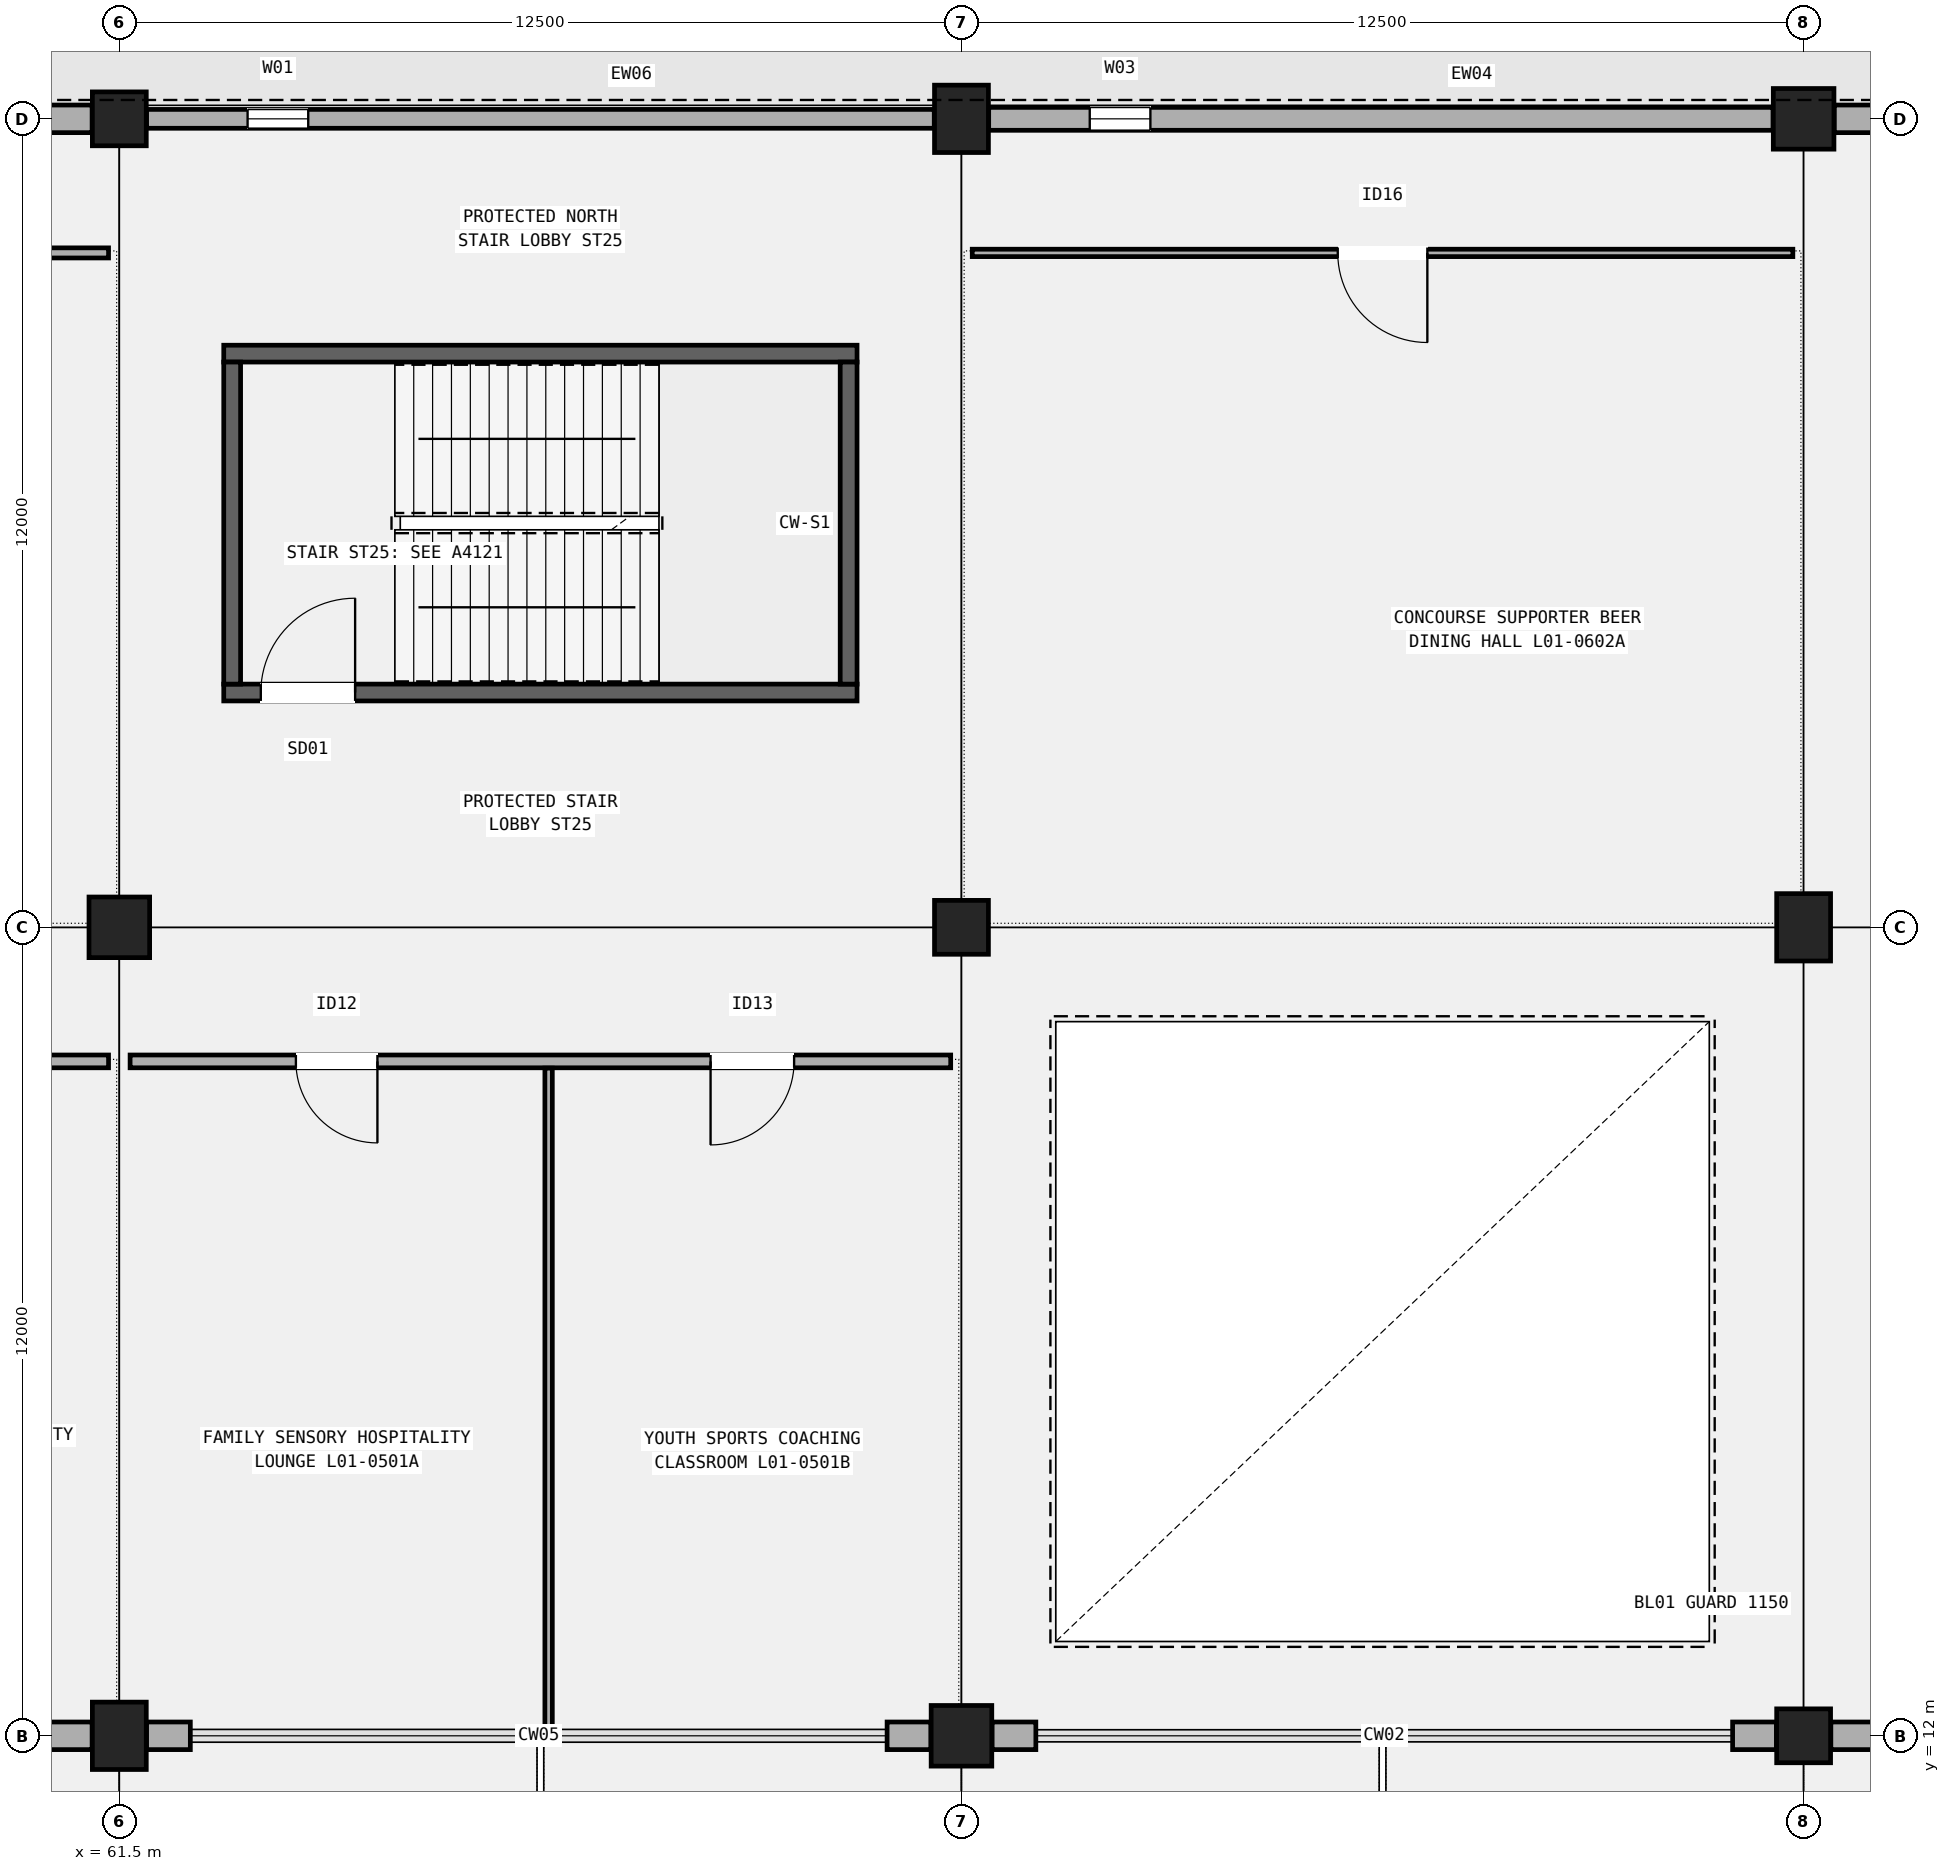
"""IFC4 building model, lengths in metres.
Left out: names, types, materials, properties, quantities, classifications, styles, units other than length and angle.
Written with IfcOpenShell. Run it as: python <this file> out.ifc"""

import sys

from ifc_helpers import new_model, si_unit, direction, frame, frame_2d, origin, origin_2d, place, context, subcontext, project, spatial, rectangle, extrude, element, fill, save


model = new_model("IFC4")
c1 = context("Model", 3, precision=1e-05, world=origin(), true_north=direction((0.0, 1.0)))
c2 = subcontext(c1, "Body", "Model", "MODEL_VIEW")
j1 = project(units=[si_unit("LENGTHUNIT", "METRE"), si_unit("PLANEANGLEUNIT", "RADIAN")], contexts=[c1])
p1 = place(None, origin())
s1 = spatial("IfcSite", under=j1, at=p1, CompositionType="ELEMENT")
p2 = place(p1, origin())
s2 = spatial("IfcBuilding", under=s1, at=p2, CompositionType="ELEMENT")
p3 = place(p2, frame((0.0, 0.0, 5.4)))
s3 = spatial("IfcBuildingStorey", under=s2, at=p3, CompositionType="ELEMENT", Elevation=5.4)
p4 = place(p3, frame((61.5, 12.0, 0.0), z_axis=(0.0, 0.0, 1.0), x_axis=(1.0, 0.0, 0.0)))
e1 = element("IfcColumn", 1, at=p4, inside=s3, PredefinedType="COLUMN", context=c2, shape_type="SweptSolid", body=[
    extrude(rectangle(XDim=0.8, YDim=1.0, at=origin_2d()), origin(), (0.0, 0.0, 1.0), 4.8),
])
p5 = place(p3, frame((61.5, 24.0, 0.0), z_axis=(0.0, 0.0, 1.0), x_axis=(1.0, 0.0, 0.0)))
e2 = element("IfcColumn", 2, at=p5, inside=s3, PredefinedType="COLUMN", context=c2, shape_type="SweptSolid", body=[
    extrude(rectangle(XDim=0.9, YDim=0.9, at=origin_2d()), origin(), (0.0, 0.0, 1.0), 4.8),
])
p6 = place(p3, frame((61.5, 36.0, 0.0), z_axis=(0.0, 0.0, 1.0), x_axis=(1.0, 0.0, 0.0)))
e3 = element("IfcColumn", 3, at=p6, inside=s3, PredefinedType="COLUMN", context=c2, shape_type="SweptSolid", body=[
    extrude(rectangle(XDim=0.8, YDim=0.8, at=origin_2d()), origin(), (0.0, 0.0, 1.0), 4.8),
])
p7 = place(p3, frame((74.0, 12.0, 0.0), z_axis=(0.0, 0.0, 1.0), x_axis=(1.0, 0.0, 0.0)))
e4 = element("IfcColumn", 4, at=p7, inside=s3, PredefinedType="COLUMN", context=c2, shape_type="SweptSolid", body=[
    extrude(rectangle(XDim=0.9, YDim=0.9, at=origin_2d()), origin(), (0.0, 0.0, 1.0), 4.8),
])
p8 = place(p3, frame((74.0, 24.0, 0.0), z_axis=(0.0, 0.0, 1.0), x_axis=(1.0, 0.0, 0.0)))
e5 = element("IfcColumn", 5, at=p8, inside=s3, PredefinedType="COLUMN", context=c2, shape_type="SweptSolid", body=[
    extrude(rectangle(XDim=0.8, YDim=0.8, at=origin_2d()), origin(), (0.0, 0.0, 1.0), 4.8),
])
p9 = place(p3, frame((74.0, 36.0, 0.0), z_axis=(0.0, 0.0, 1.0), x_axis=(1.0, 0.0, 0.0)))
e6 = element("IfcColumn", 6, at=p9, inside=s3, PredefinedType="COLUMN", context=c2, shape_type="SweptSolid", body=[
    extrude(rectangle(XDim=0.8, YDim=1.0, at=origin_2d()), origin(), (0.0, 0.0, 1.0), 4.8),
])
p10 = place(p3, frame((86.5, 12.0, 0.0), z_axis=(0.0, 0.0, 1.0), x_axis=(1.0, 0.0, 0.0)))
e7 = element("IfcColumn", 7, at=p10, inside=s3, PredefinedType="COLUMN", context=c2, shape_type="SweptSolid", body=[
    extrude(rectangle(XDim=0.8, YDim=0.8, at=origin_2d()), origin(), (0.0, 0.0, 1.0), 4.8),
])
p11 = place(p3, frame((86.5, 24.0, 0.0), z_axis=(0.0, 0.0, 1.0), x_axis=(1.0, 0.0, 0.0)))
e8 = element("IfcColumn", 8, at=p11, inside=s3, PredefinedType="COLUMN", context=c2, shape_type="SweptSolid", body=[
    extrude(rectangle(XDim=0.8, YDim=1.0, at=origin_2d()), origin(), (0.0, 0.0, 1.0), 4.8),
])
p12 = place(p3, frame((86.5, 36.0, 0.0), z_axis=(0.0, 0.0, 1.0), x_axis=(1.0, 0.0, 0.0)))
e9 = element("IfcColumn", 9, at=p12, inside=s3, PredefinedType="COLUMN", context=c2, shape_type="SweptSolid", body=[
    extrude(rectangle(XDim=0.9, YDim=0.9, at=origin_2d()), origin(), (0.0, 0.0, 1.0), 4.8),
])
p13 = place(p3, frame((60.446, 12.0, 0.0), z_axis=(0.0, 0.0, 1.0), x_axis=(1.0, 0.0, 0.0)))
e10 = element("IfcWall", 10, at=p13, inside=s3, PredefinedType="SOLIDWALL", context=c2, shape_type="SweptSolid", body=[
    extrude(rectangle(XDim=0.65, YDim=0.41, at=frame_2d((0.325, 0.0))), origin(), (0.0, 0.0, 1.0), 4.2),
])
p14 = place(p3, frame((49.454, 36.0, 0.0), z_axis=(0.0, 0.0, 1.0), x_axis=(1.0, 0.0, 0.0)))
e11 = element("IfcWall", 11, at=p14, inside=s3, PredefinedType="SOLIDWALL", context=c2, shape_type="SweptSolid", body=[
    extrude(rectangle(XDim=11.642, YDim=0.41, at=frame_2d((5.821, 0.0))), origin(), (0.0, 0.0, 1.0), 4.2),
])
p15 = place(p14, frame((1.5, 0.0, 0.95)))
e12 = element("IfcOpeningElement", 12, at=p15, cuts=e11, PredefinedType="OPENING", context=c2, shape_type="SweptSolid", body=[
    extrude(rectangle(XDim=3.6, YDim=1.75, at=frame_2d((1.8, 0.875))), frame((0.0, 0.215, 0.0), z_axis=(0.0, -1.0, 0.0), x_axis=(1.0, 0.0, 0.0)), (0.0, 0.0, 1.0), 0.43),
])
for number, where, z_axis, x_axis in (
    (13, (61.904, 12.0, 0.0), (0.0, 0.0, 1.0), (1.0, 0.0, 0.0)),
    (14, (72.896, 12.0, 0.0), (0.0, 0.0, 1.0), (1.0, 0.0, 0.0)),
):
    element("IfcWall", number, at=place(p3, frame(where, z_axis=z_axis, x_axis=x_axis)), inside=s3, PredefinedType="SOLIDWALL", context=c2, shape_type="SweptSolid", body=[
        extrude(rectangle(XDim=0.65, YDim=0.41, at=frame_2d((0.325, 0.0))), origin(), (0.0, 0.0, 1.0), 4.15),
    ])
p16 = place(p3, frame((61.904, 36.0, 0.0), z_axis=(0.0, 0.0, 1.0), x_axis=(1.0, 0.0, 0.0)))
e15 = element("IfcWall", 15, at=p16, inside=s3, PredefinedType="SOLIDWALL", context=c2, shape_type="SweptSolid", body=[
    extrude(rectangle(XDim=11.692, YDim=0.28, at=frame_2d((5.846, 0.0))), origin(), (0.0, 0.0, 1.0), 4.15),
])
p17 = place(p16, frame((1.5, 0.0, 0.95)))
e16 = element("IfcOpeningElement", 16, at=p17, cuts=e15, PredefinedType="OPENING", context=c2, shape_type="SweptSolid", body=[
    extrude(rectangle(XDim=0.9, YDim=2.1, at=frame_2d((0.45, 1.05))), frame((0.0, 0.15, 0.0), z_axis=(0.0, -1.0, 0.0), x_axis=(1.0, 0.0, 0.0)), (0.0, 0.0, 1.0), 0.3),
])
for number, where, z_axis, x_axis in (
    (17, (74.454, 12.0, 0.0), (0.0, 0.0, 1.0), (1.0, 0.0, 0.0)),
    (18, (85.446, 12.0, 0.0), (0.0, 0.0, 1.0), (1.0, 0.0, 0.0)),
):
    element("IfcWall", number, at=place(p3, frame(where, z_axis=z_axis, x_axis=x_axis)), inside=s3, PredefinedType="SOLIDWALL", context=c2, shape_type="SweptSolid", body=[
        extrude(rectangle(XDim=0.65, YDim=0.41, at=frame_2d((0.325, 0.0))), origin(), (0.0, 0.0, 1.0), 4.2),
    ])
p18 = place(p3, frame((74.404, 36.0, 0.0), z_axis=(0.0, 0.0, 1.0), x_axis=(1.0, 0.0, 0.0)))
e19 = element("IfcWall", 19, at=p18, inside=s3, PredefinedType="SOLIDWALL", context=c2, shape_type="SweptSolid", body=[
    extrude(rectangle(XDim=11.642, YDim=0.34, at=frame_2d((5.821, 0.0))), origin(), (0.0, 0.0, 1.0), 4.2),
])
p19 = place(p18, frame((1.5, 0.0, 0.95)))
e20 = element("IfcOpeningElement", 20, at=p19, cuts=e19, PredefinedType="OPENING", context=c2, shape_type="SweptSolid", body=[
    extrude(rectangle(XDim=0.9, YDim=2.7, at=frame_2d((0.45, 1.35))), frame((0.0, 0.18, 0.0), z_axis=(0.0, -1.0, 0.0), x_axis=(1.0, 0.0, 0.0)), (0.0, 0.0, 1.0), 0.36),
])
p20 = place(p3, frame((86.904, 12.0, 0.0), z_axis=(0.0, 0.0, 1.0), x_axis=(1.0, 0.0, 0.0)))
e21 = element("IfcWall", 21, at=p20, inside=s3, PredefinedType="SOLIDWALL", context=c2, shape_type="SweptSolid", body=[
    extrude(rectangle(XDim=0.65, YDim=0.41, at=frame_2d((0.325, 0.0))), origin(), (0.0, 0.0, 1.0), 4.15),
])
p21 = place(p3, frame((86.954, 36.0, 0.0), z_axis=(0.0, 0.0, 1.0), x_axis=(1.0, 0.0, 0.0)))
e22 = element("IfcWall", 22, at=p21, inside=s3, PredefinedType="SOLIDWALL", context=c2, shape_type="SweptSolid", body=[
    extrude(rectangle(XDim=11.642, YDim=0.41, at=frame_2d((5.821, 0.0))), origin(), (0.0, 0.0, 1.0), 4.15),
])
p22 = place(p21, frame((1.5, 0.0, 0.95)))
e23 = element("IfcOpeningElement", 23, at=p22, cuts=e22, PredefinedType="OPENING", context=c2, shape_type="SweptSolid", body=[
    extrude(rectangle(XDim=1.2, YDim=1.9, at=frame_2d((0.6, 0.95))), frame((0.0, 0.215, 0.0), z_axis=(0.0, -1.0, 0.0), x_axis=(1.0, 0.0, 0.0)), (0.0, 0.0, 1.0), 0.43),
])
p23 = place(p3, frame((63.05, 27.485, 0.0), z_axis=(0.0, 0.0, 1.0), x_axis=(1.0, 0.0, 0.0)))
e24 = element("IfcWall", 24, at=p23, inside=s3, PredefinedType="SHEAR", context=c2, shape_type="SweptSolid", body=[
    extrude(rectangle(XDim=9.4, YDim=0.25, at=frame_2d((4.7, 0.0))), origin(), (0.0, 0.0, 1.0), 4.55),
])
p24 = place(p23, frame((0.55, 0.0, 0.0)))
e25 = element("IfcOpeningElement", 25, at=p24, cuts=e24, PredefinedType="OPENING", context=c2, shape_type="SweptSolid", body=[
    extrude(rectangle(XDim=1.4, YDim=2.15, at=frame_2d((0.7, 1.075))), frame((0.0, 0.135, 0.0), z_axis=(0.0, -1.0, 0.0), x_axis=(1.0, 0.0, 0.0)), (0.0, 0.0, 1.0), 0.27),
])
p25 = place(p3, frame((63.05, 32.515, 0.0), z_axis=(0.0, 0.0, 1.0), x_axis=(1.0, 0.0, 0.0)))
e26 = element("IfcWall", 26, at=p25, inside=s3, PredefinedType="SHEAR", context=c2, shape_type="SweptSolid", body=[
    extrude(rectangle(XDim=9.4, YDim=0.25, at=frame_2d((4.7, 0.0))), origin(), (0.0, 0.0, 1.0), 4.55),
])
for number, where, z_axis, x_axis in (
    (27, (63.175, 27.61, 0.0), (0.0, 0.0, 1.0), (0.0, 1.0, 0.0)),
    (28, (72.325, 27.61, 0.0), (0.0, 0.0, 1.0), (0.0, 1.0, 0.0)),
):
    element("IfcWall", number, at=place(p3, frame(where, z_axis=z_axis, x_axis=x_axis)), inside=s3, PredefinedType="SHEAR", context=c2, shape_type="SweptSolid", body=[
        extrude(rectangle(XDim=4.78, YDim=0.25, at=frame_2d((2.39, 0.0))), origin(), (0.0, 0.0, 1.0), 4.55),
    ])
p26 = place(p3, frame((50.92, 22.01, 0.0), z_axis=(0.0, 0.0, 1.0), x_axis=(1.0, 0.0, 0.0)))
e29 = element("IfcWall", 29, at=p26, inside=s3, PredefinedType="PARTITIONING", context=c2, shape_type="SweptSolid", body=[
    extrude(rectangle(XDim=10.42, YDim=0.19, at=frame_2d((5.21, 0.0))), origin(), (0.0, 0.0, 1.0), 3.92),
])
p27 = place(p26, frame((3.147, 0.0, 0.0), z_axis=(0.0, 0.0, 1.0), x_axis=(-1.0, 0.0, 0.0)))
e30 = element("IfcOpeningElement", 30, at=p27, cuts=e29, PredefinedType="OPENING", context=c2, shape_type="SweptSolid", body=[
    extrude(rectangle(XDim=1.06, YDim=2.15, at=frame_2d((0.53, 1.075))), frame((0.0, 0.105, 0.0), z_axis=(0.0, -1.0, 0.0), x_axis=(1.0, 0.0, 0.0)), (0.0, 0.0, 1.0), 0.21),
])
p28 = place(p26, frame((8.452, 0.0, 0.0), z_axis=(0.0, 0.0, 1.0), x_axis=(-1.0, 0.0, 0.0)))
e31 = element("IfcOpeningElement", 31, at=p28, cuts=e29, PredefinedType="OPENING", context=c2, shape_type="SweptSolid", body=[
    extrude(rectangle(XDim=1.09, YDim=2.16, at=frame_2d((0.545, 1.08))), frame((0.0, 0.105, 0.0), z_axis=(0.0, -1.0, 0.0), x_axis=(1.0, 0.0, 0.0)), (0.0, 0.0, 1.0), 0.21),
])
p29 = place(p3, frame((50.92, 34.01, 0.0), z_axis=(0.0, 0.0, 1.0), x_axis=(1.0, 0.0, 0.0)))
e32 = element("IfcWall", 32, at=p29, inside=s3, PredefinedType="PARTITIONING", context=c2, shape_type="SweptSolid", body=[
    extrude(rectangle(XDim=10.42, YDim=0.15, at=frame_2d((5.21, 0.0))), origin(), (0.0, 0.0, 1.0), 3.92),
])
p30 = place(p29, frame((5.77, 0.0, 0.0), z_axis=(0.0, 0.0, 1.0), x_axis=(-1.0, 0.0, 0.0)))
e33 = element("IfcOpeningElement", 33, at=p30, cuts=e32, PredefinedType="OPENING", context=c2, shape_type="SweptSolid", body=[
    extrude(rectangle(XDim=1.12, YDim=2.18, at=frame_2d((0.56, 1.09))), frame((0.0, 0.085, 0.0), z_axis=(0.0, -1.0, 0.0), x_axis=(1.0, 0.0, 0.0)), (0.0, 0.0, 1.0), 0.17),
])
p31 = place(p3, frame((61.66, 22.01, 0.0), z_axis=(0.0, 0.0, 1.0), x_axis=(1.0, 0.0, 0.0)))
e34 = element("IfcWall", 34, at=p31, inside=s3, PredefinedType="PARTITIONING", context=c2, shape_type="SweptSolid", body=[
    extrude(rectangle(XDim=12.18, YDim=0.19, at=frame_2d((6.09, 0.0))), origin(), (0.0, 0.0, 1.0), 3.92),
])
p32 = place(p31, frame((3.671, 0.0, 0.0), z_axis=(0.0, 0.0, 1.0), x_axis=(-1.0, 0.0, 0.0)))
e35 = element("IfcOpeningElement", 35, at=p32, cuts=e34, PredefinedType="OPENING", context=c2, shape_type="SweptSolid", body=[
    extrude(rectangle(XDim=1.21, YDim=2.18, at=frame_2d((0.605, 1.09))), frame((0.0, 0.105, 0.0), z_axis=(0.0, -1.0, 0.0), x_axis=(1.0, 0.0, 0.0)), (0.0, 0.0, 1.0), 0.21),
])
p33 = place(p31, frame((9.856, 0.0, 0.0), z_axis=(0.0, 0.0, 1.0), x_axis=(-1.0, 0.0, 0.0)))
e36 = element("IfcOpeningElement", 36, at=p33, cuts=e34, PredefinedType="OPENING", context=c2, shape_type="SweptSolid", body=[
    extrude(rectangle(XDim=1.24, YDim=2.22, at=frame_2d((0.62, 1.11))), frame((0.0, 0.105, 0.0), z_axis=(0.0, -1.0, 0.0), x_axis=(1.0, 0.0, 0.0)), (0.0, 0.0, 1.0), 0.21),
])
p34 = place(p3, frame((67.872, 12.024, 0.0), z_axis=(0.0, 0.0, 1.0), x_axis=(0.0, 1.0, 0.0)))
e37 = element("IfcWall", 37, at=p34, inside=s3, PredefinedType="PARTITIONING", context=c2, shape_type="SweptSolid", body=[
    extrude(rectangle(XDim=9.886, YDim=0.11, at=frame_2d((4.943, 0.0))), origin(), (0.0, 0.0, 1.0), 3.92),
])
p35 = place(p3, frame((74.16, 34.01, 0.0), z_axis=(0.0, 0.0, 1.0), x_axis=(1.0, 0.0, 0.0)))
e38 = element("IfcWall", 38, at=p35, inside=s3, PredefinedType="PARTITIONING", context=c2, shape_type="SweptSolid", body=[
    extrude(rectangle(XDim=12.18, YDim=0.11, at=frame_2d((6.09, 0.0))), origin(), (0.0, 0.0, 1.0), 3.92),
])
p36 = place(p35, frame((6.755, 0.0, 0.0), z_axis=(0.0, 0.0, 1.0), x_axis=(-1.0, 0.0, 0.0)))
e39 = element("IfcOpeningElement", 39, at=p36, cuts=e38, PredefinedType="OPENING", context=c2, shape_type="SweptSolid", body=[
    extrude(rectangle(XDim=1.33, YDim=2.22, at=frame_2d((0.665, 1.11))), frame((0.0, 0.065, 0.0), z_axis=(0.0, -1.0, 0.0), x_axis=(1.0, 0.0, 0.0)), (0.0, 0.0, 1.0), 0.13),
])
p37 = place(p17, origin())
e40 = element("IfcWindow", 40, at=p37, inside=s3, PartitioningType="SINGLE_PANEL", PredefinedType="WINDOW", context=c2, shape_type="SweptSolid", body=[
    extrude(rectangle(XDim=0.9, YDim=2.1, at=frame_2d((0.45, 1.05))), frame((0.0, 0.03, 0.0), z_axis=(0.0, -1.0, 0.0), x_axis=(1.0, 0.0, 0.0)), (0.0, 0.0, 1.0), 0.06),
])
fill(e16, e40)
p38 = place(p19, origin())
e41 = element("IfcWindow", 41, at=p38, inside=s3, PartitioningType="SINGLE_PANEL", PredefinedType="WINDOW", context=c2, shape_type="SweptSolid", body=[
    extrude(rectangle(XDim=0.9, YDim=2.7, at=frame_2d((0.45, 1.35))), frame((0.0, 0.03, 0.0), z_axis=(0.0, -1.0, 0.0), x_axis=(1.0, 0.0, 0.0)), (0.0, 0.0, 1.0), 0.06),
])
fill(e20, e41)
p39 = place(p24, origin())
e42 = element("IfcDoor", 42, at=p39, inside=s3, OperationType="SINGLE_SWING_RIGHT", PredefinedType="DOOR", context=c2, shape_type="SweptSolid", body=[
    extrude(rectangle(XDim=1.4, YDim=2.15, at=frame_2d((0.7, 1.075))), frame((0.0, 0.025, 0.0), z_axis=(0.0, -1.0, 0.0), x_axis=(1.0, 0.0, 0.0)), (0.0, 0.0, 1.0), 0.05),
])
fill(e25, e42)
p40 = place(p32, origin())
e43 = element("IfcDoor", 43, at=p40, inside=s3, OperationType="SINGLE_SWING_LEFT", PredefinedType="DOOR", context=c2, shape_type="SweptSolid", body=[
    extrude(rectangle(XDim=1.21, YDim=2.18, at=frame_2d((0.605, 1.09))), frame((0.0, 0.025, 0.0), z_axis=(0.0, -1.0, 0.0), x_axis=(1.0, 0.0, 0.0)), (0.0, 0.0, 1.0), 0.05),
])
fill(e35, e43)
p41 = place(p33, origin())
e44 = element("IfcDoor", 44, at=p41, inside=s3, OperationType="SINGLE_SWING_RIGHT", PredefinedType="DOOR", context=c2, shape_type="SweptSolid", body=[
    extrude(rectangle(XDim=1.24, YDim=2.22, at=frame_2d((0.62, 1.11))), frame((0.0, 0.025, 0.0), z_axis=(0.0, -1.0, 0.0), x_axis=(1.0, 0.0, 0.0)), (0.0, 0.0, 1.0), 0.05),
])
fill(e36, e44)
p42 = place(p36, origin())
e45 = element("IfcDoor", 45, at=p42, inside=s3, OperationType="SINGLE_SWING_LEFT", PredefinedType="DOOR", context=c2, shape_type="SweptSolid", body=[
    extrude(rectangle(XDim=1.33, YDim=2.22, at=frame_2d((0.665, 1.11))), frame((0.0, 0.025, 0.0), z_axis=(0.0, -1.0, 0.0), x_axis=(1.0, 0.0, 0.0)), (0.0, 0.0, 1.0), 0.05),
])
fill(e39, e45)
save(model, sys.argv[1])
